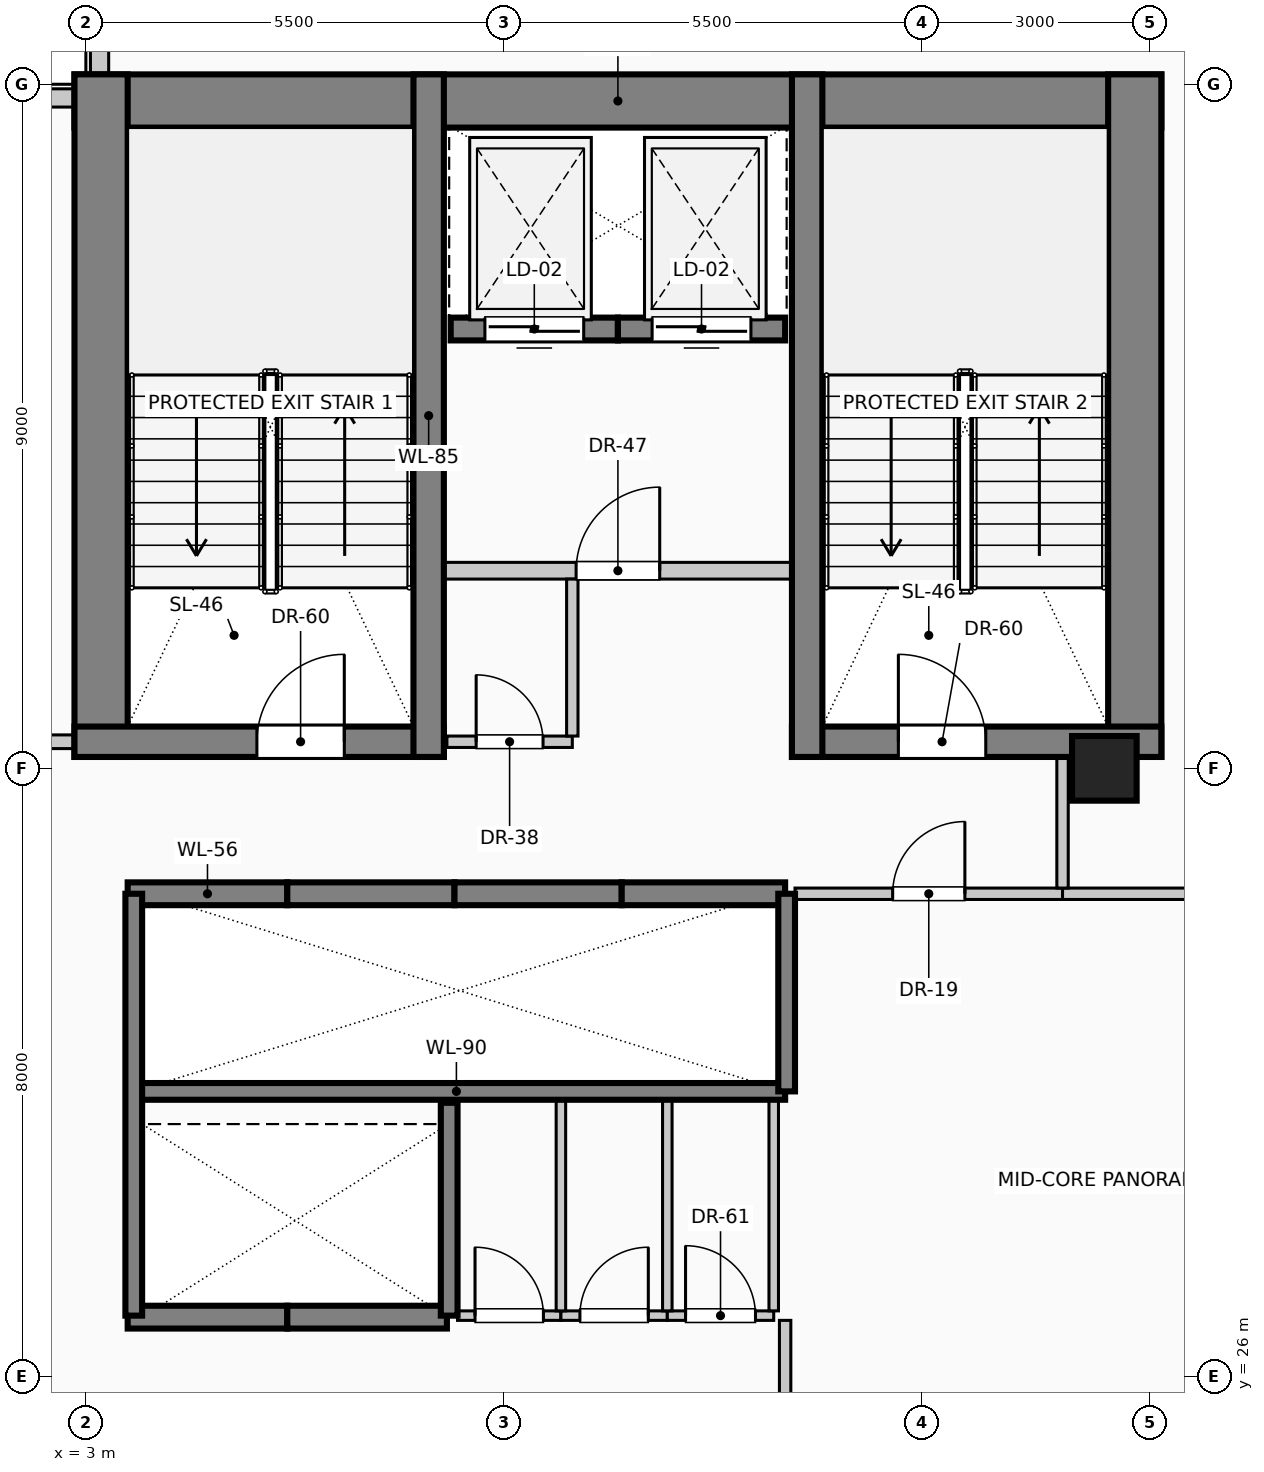
"""IFC4 building model, lengths in metres.
Left out: names, types, materials, properties, quantities, classifications, styles, units other than length and angle.
Written with IfcOpenShell. Run it as: python <this file> out.ifc"""

import sys

from ifc_helpers import new_model, si_unit, direction, frame, frame_2d, origin, origin_2d, place, context, subcontext, project, spatial, rectangle, circle, extrude, element, fill, save


model = new_model("IFC4")
c1 = context("Model", 3, precision=1e-05, world=origin(), true_north=direction((0.0, 1.0)))
c2 = subcontext(c1, "Body", "Model", "MODEL_VIEW")
j1 = project(units=[si_unit("LENGTHUNIT", "METRE"), si_unit("PLANEANGLEUNIT", "RADIAN")], contexts=[c1])
p1 = place(None, origin())
s1 = spatial("IfcSite", under=j1, at=p1, CompositionType="ELEMENT")
p2 = place(p1, origin())
s2 = spatial("IfcBuilding", under=s1, at=p2, CompositionType="ELEMENT")
p3 = place(p2, frame((0.0, 0.0, 186.6)))
s3 = spatial("IfcBuildingStorey", under=s2, at=p3, CompositionType="ELEMENT", Elevation=186.6)
p4 = place(p3, frame((2.85, 42.78, 0.0), z_axis=(0.0, 0.0, 1.0), x_axis=(1.0, 0.0, 0.0)))
e1 = element("IfcWall", 1, at=p4, inside=s3, PredefinedType="SHEAR", context=c2, shape_type="SweptSolid", body=[
    extrude(rectangle(XDim=14.3, YDim=0.7, at=frame_2d((7.15, 0.0))), origin(), (0.0, 0.0, 1.0), 4.0),
])
for number, where, z_axis, x_axis in (
    (2, (3.2, 34.15, 0.0), (0.0, 0.0, 1.0), (0.0, 1.0, 0.0)),
    (3, (16.8, 34.15, 0.0), (0.0, 0.0, 1.0), (0.0, 1.0, 0.0)),
):
    element("IfcWall", number, at=place(p3, frame(where, z_axis=z_axis, x_axis=x_axis)), inside=s3, PredefinedType="SHEAR", context=c2, shape_type="SweptSolid", body=[
        extrude(rectangle(XDim=8.98, YDim=0.7, at=frame_2d((4.49, 0.0))), origin(), (0.0, 0.0, 1.0), 4.0),
    ])
p5 = place(p3, frame((2.85, 34.35, 0.0), z_axis=(0.0, 0.0, 1.0), x_axis=(1.0, 0.0, 0.0)))
e4 = element("IfcWall", 4, at=p5, inside=s3, PredefinedType="SHEAR", context=c2, shape_type="SweptSolid", body=[
    extrude(rectangle(XDim=4.86, YDim=0.4, at=frame_2d((2.43, 0.0))), origin(), (0.0, 0.0, 1.0), 4.0),
])
p6 = place(p5, frame((2.4, 0.0, 0.0)))
e5 = element("IfcOpeningElement", 5, at=p6, cuts=e4, PredefinedType="OPENING", context=c2, shape_type="SweptSolid", body=[
    extrude(rectangle(XDim=1.15, YDim=2.2, at=frame_2d((0.575, 1.1))), frame((0.0, 0.21, 0.0), z_axis=(0.0, -1.0, 0.0), x_axis=(1.0, 0.0, 0.0)), (0.0, 0.0, 1.0), 0.42),
])
p7 = place(p3, frame((12.29, 34.35, 0.0), z_axis=(0.0, 0.0, 1.0), x_axis=(1.0, 0.0, 0.0)))
e6 = element("IfcWall", 6, at=p7, inside=s3, PredefinedType="SHEAR", context=c2, shape_type="SweptSolid", body=[
    extrude(rectangle(XDim=4.86, YDim=0.4, at=frame_2d((2.43, 0.0))), origin(), (0.0, 0.0, 1.0), 4.0),
])
p8 = place(p7, frame((1.4, 0.0, 0.0)))
e7 = element("IfcOpeningElement", 7, at=p8, cuts=e6, PredefinedType="OPENING", context=c2, shape_type="SweptSolid", body=[
    extrude(rectangle(XDim=1.15, YDim=2.2, at=frame_2d((0.575, 1.1))), frame((0.0, 0.21, 0.0), z_axis=(0.0, -1.0, 0.0), x_axis=(1.0, 0.0, 0.0)), (0.0, 0.0, 1.0), 0.42),
])
for number, where, z_axis, x_axis in (
    (8, (7.51, 34.15, 0.0), (0.0, 0.0, 1.0), (0.0, 1.0, 0.0)),
    (9, (12.49, 34.15, 0.0), (0.0, 0.0, 1.0), (0.0, 1.0, 0.0)),
):
    element("IfcWall", number, at=place(p3, frame(where, z_axis=z_axis, x_axis=x_axis)), inside=s3, PredefinedType="SHEAR", context=c2, shape_type="SweptSolid", body=[
        extrude(rectangle(XDim=8.98, YDim=0.4, at=frame_2d((4.49, 0.0))), origin(), (0.0, 0.0, 1.0), 4.0),
    ])
p9 = place(p3, frame((16.4, 34.0, 0.0), z_axis=(0.0, 0.0, 1.0), x_axis=(1.0, 0.0, 0.0)))
e10 = element("IfcColumn", 10, at=p9, inside=s3, PredefinedType="COLUMN", context=c2, shape_type="SweptSolid", body=[
    extrude(circle(Radius=0.425, at=origin_2d()), origin(), (0.0, 0.0, 1.0), 4.0),
])
p10 = place(p3, frame((0.6, 42.82, 0.0), z_axis=(0.0, 0.0, 1.0), x_axis=(1.0, 0.0, 0.0)))
e11 = element("IfcWall", 11, at=p10, inside=s3, PredefinedType="SOLIDWALL", context=c2, shape_type="SweptSolid", body=[
    extrude(rectangle(XDim=2.245, YDim=0.24, at=frame_2d((1.123, 0.0))), origin(), (0.0, 0.0, 1.0), 3.75),
])
p11 = place(p3, frame((3.18, 43.135, 0.0), z_axis=(0.0, 0.0, 1.0), x_axis=(0.0, 1.0, 0.0)))
e12 = element("IfcWall", 12, at=p11, inside=s3, PredefinedType="SOLIDWALL", context=c2, shape_type="SweptSolid", body=[
    extrude(rectangle(XDim=2.265, YDim=0.24, at=frame_2d((1.132, 0.0))), origin(), (0.0, 0.0, 1.0), 3.75),
])
p12 = place(p3, frame((3.55, 32.35, 0.0), z_axis=(0.0, 0.0, 1.0), x_axis=(1.0, 0.0, 0.0)))
e13 = element("IfcWall", 13, at=p12, inside=s3, PredefinedType="SOLIDWALL", context=c2, shape_type="SweptSolid", body=[
    extrude(rectangle(XDim=2.1, YDim=0.3, at=frame_2d((1.05, 0.0))), origin(), (0.0, 0.0, 1.0), 4.0),
])
p13 = place(p3, frame((5.65, 32.35, 0.0), z_axis=(0.0, 0.0, 1.0), x_axis=(1.0, 0.0, 0.0)))
e14 = element("IfcWall", 14, at=p13, inside=s3, PredefinedType="SOLIDWALL", context=c2, shape_type="SweptSolid", body=[
    extrude(rectangle(XDim=2.2, YDim=0.3, at=frame_2d((1.1, 0.0))), origin(), (0.0, 0.0, 1.0), 4.0),
])
p14 = place(p3, frame((7.85, 32.35, 0.0), z_axis=(0.0, 0.0, 1.0), x_axis=(1.0, 0.0, 0.0)))
e15 = element("IfcWall", 15, at=p14, inside=s3, PredefinedType="SOLIDWALL", context=c2, shape_type="SweptSolid", body=[
    extrude(rectangle(XDim=2.2, YDim=0.3, at=frame_2d((1.1, 0.0))), origin(), (0.0, 0.0, 1.0), 4.0),
])
p15 = place(p3, frame((10.05, 32.35, 0.0), z_axis=(0.0, 0.0, 1.0), x_axis=(1.0, 0.0, 0.0)))
e16 = element("IfcWall", 16, at=p15, inside=s3, PredefinedType="SOLIDWALL", context=c2, shape_type="SweptSolid", body=[
    extrude(rectangle(XDim=2.15, YDim=0.3, at=frame_2d((1.075, 0.0))), origin(), (0.0, 0.0, 1.0), 4.0),
])
p16 = place(p3, frame((5.65, 26.78, 0.0), z_axis=(0.0, 0.0, 1.0), x_axis=(-1.0, 0.0, 0.0)))
e17 = element("IfcWall", 17, at=p16, inside=s3, PredefinedType="SOLIDWALL", context=c2, shape_type="SweptSolid", body=[
    extrude(rectangle(XDim=2.1, YDim=0.3, at=frame_2d((1.05, 0.0))), origin(), (0.0, 0.0, 1.0), 4.0),
])
p17 = place(p3, frame((7.75, 26.78, 0.0), z_axis=(0.0, 0.0, 1.0), x_axis=(-1.0, 0.0, 0.0)))
e18 = element("IfcWall", 18, at=p17, inside=s3, PredefinedType="SOLIDWALL", context=c2, shape_type="SweptSolid", body=[
    extrude(rectangle(XDim=2.1, YDim=0.3, at=frame_2d((1.05, 0.0))), origin(), (0.0, 0.0, 1.0), 4.0),
])
p18 = place(p3, frame((10.0, 39.78, 0.0), z_axis=(0.0, 0.0, 1.0), x_axis=(-1.0, 0.0, 0.0)))
e19 = element("IfcWall", 19, at=p18, inside=s3, PredefinedType="SOLIDWALL", context=c2, shape_type="SweptSolid", body=[
    extrude(rectangle(XDim=2.2, YDim=0.3, at=frame_2d((1.1, 0.0))), origin(), (0.0, 0.0, 1.0), 4.0),
])
p19 = place(p18, frame((0.45, 0.0, 0.0)))
e20 = element("IfcOpeningElement", 20, at=p19, cuts=e19, PredefinedType="OPENING", context=c2, shape_type="SweptSolid", body=[
    extrude(rectangle(XDim=1.3, YDim=2.25, at=frame_2d((0.65, 1.125))), frame((0.0, 0.16, 0.0), z_axis=(0.0, -1.0, 0.0), x_axis=(1.0, 0.0, 0.0)), (0.0, 0.0, 1.0), 0.32),
])
p20 = place(p3, frame((12.2, 39.78, 0.0), z_axis=(0.0, 0.0, 1.0), x_axis=(-1.0, 0.0, 0.0)))
e21 = element("IfcWall", 21, at=p20, inside=s3, PredefinedType="SOLIDWALL", context=c2, shape_type="SweptSolid", body=[
    extrude(rectangle(XDim=2.2, YDim=0.3, at=frame_2d((1.1, 0.0))), origin(), (0.0, 0.0, 1.0), 4.0),
])
p21 = place(p20, frame((0.45, 0.0, 0.0)))
e22 = element("IfcOpeningElement", 22, at=p21, cuts=e21, PredefinedType="OPENING", context=c2, shape_type="SweptSolid", body=[
    extrude(rectangle(XDim=1.3, YDim=2.25, at=frame_2d((0.65, 1.125))), frame((0.0, 0.16, 0.0), z_axis=(0.0, -1.0, 0.0), x_axis=(1.0, 0.0, 0.0)), (0.0, 0.0, 1.0), 0.32),
])
p22 = place(p3, frame((3.55, 29.75, 0.0), z_axis=(0.0, 0.0, 1.0), x_axis=(1.0, 0.0, 0.0)))
e23 = element("IfcWall", 23, at=p22, inside=s3, PredefinedType="SOLIDWALL", context=c2, shape_type="SweptSolid", body=[
    extrude(rectangle(XDim=8.65, YDim=0.22, at=frame_2d((4.325, 0.0))), origin(), (0.0, 0.0, 1.0), 4.0),
])
p23 = place(p3, frame((3.63, 26.8, 0.0), z_axis=(0.0, 0.0, 1.0), x_axis=(0.0, 1.0, 0.0)))
e24 = element("IfcWall", 24, at=p23, inside=s3, PredefinedType="SOLIDWALL", context=c2, shape_type="SweptSolid", body=[
    extrude(rectangle(XDim=5.55, YDim=0.22, at=frame_2d((2.775, 0.0))), origin(), (0.0, 0.0, 1.0), 4.0),
])
p24 = place(p3, frame((7.78, 26.8, 0.0), z_axis=(0.0, 0.0, 1.0), x_axis=(0.0, 1.0, 0.0)))
e25 = element("IfcWall", 25, at=p24, inside=s3, PredefinedType="SOLIDWALL", context=c2, shape_type="SweptSolid", body=[
    extrude(rectangle(XDim=2.8, YDim=0.22, at=frame_2d((1.4, 0.0))), origin(), (0.0, 0.0, 1.0), 4.0),
])
p25 = place(p3, frame((12.22, 29.75, 0.0), z_axis=(0.0, 0.0, 1.0), x_axis=(0.0, 1.0, 0.0)))
e26 = element("IfcWall", 26, at=p25, inside=s3, PredefinedType="SOLIDWALL", context=c2, shape_type="SweptSolid", body=[
    extrude(rectangle(XDim=2.6, YDim=0.22, at=frame_2d((1.3, 0.0))), origin(), (0.0, 0.0, 1.0), 4.0),
])
p26 = place(p3, frame((7.51, 36.6, 0.0), z_axis=(0.0, 0.0, 1.0), x_axis=(1.0, 0.0, 0.0)))
e27 = element("IfcWall", 27, at=p26, inside=s3, PredefinedType="PARTITIONING", context=c2, shape_type="SweptSolid", body=[
    extrude(rectangle(XDim=4.98, YDim=0.22, at=frame_2d((2.49, 0.0))), origin(), (0.0, 0.0, 1.0), 3.75),
])
p27 = place(p26, frame((1.94, 0.0, 0.0)))
e28 = element("IfcOpeningElement", 28, at=p27, cuts=e27, PredefinedType="OPENING", context=c2, shape_type="SweptSolid", body=[
    extrude(rectangle(XDim=1.1, YDim=2.2, at=frame_2d((0.55, 1.1))), frame((0.0, 0.12, 0.0), z_axis=(0.0, -1.0, 0.0), x_axis=(1.0, 0.0, 0.0)), (0.0, 0.0, 1.0), 0.24),
])
p28 = place(p3, frame((7.89, 26.8, 0.0), z_axis=(0.0, 0.0, 1.0), x_axis=(1.0, 0.0, 0.0)))
e29 = element("IfcWall", 29, at=p28, inside=s3, PredefinedType="PARTITIONING", context=c2, shape_type="SweptSolid", body=[
    extrude(rectangle(XDim=1.36, YDim=0.125, at=frame_2d((0.68, 0.0))), origin(), (0.0, 0.0, 1.0), 3.75),
])
p29 = place(p28, frame((0.23, 0.0, 0.0)))
e30 = element("IfcOpeningElement", 30, at=p29, cuts=e29, PredefinedType="OPENING", context=c2, shape_type="SweptSolid", body=[
    extrude(rectangle(XDim=0.9, YDim=2.1, at=frame_2d((0.45, 1.05))), frame((0.0, 0.073, 0.0), z_axis=(0.0, -1.0, 0.0), x_axis=(1.0, 0.0, 0.0)), (0.0, 0.0, 1.0), 0.145),
])
p30 = place(p3, frame((9.25, 26.8, 0.0), z_axis=(0.0, 0.0, 1.0), x_axis=(1.0, 0.0, 0.0)))
e31 = element("IfcWall", 31, at=p30, inside=s3, PredefinedType="PARTITIONING", context=c2, shape_type="SweptSolid", body=[
    extrude(rectangle(XDim=1.4, YDim=0.125, at=frame_2d((0.7, 0.0))), origin(), (0.0, 0.0, 1.0), 3.75),
])
p31 = place(p30, frame((0.25, 0.0, 0.0)))
e32 = element("IfcOpeningElement", 32, at=p31, cuts=e31, PredefinedType="OPENING", context=c2, shape_type="SweptSolid", body=[
    extrude(rectangle(XDim=0.9, YDim=2.1, at=frame_2d((0.45, 1.05))), frame((0.0, 0.073, 0.0), z_axis=(0.0, -1.0, 0.0), x_axis=(1.0, 0.0, 0.0)), (0.0, 0.0, 1.0), 0.145),
])
p32 = place(p3, frame((10.65, 26.8, 0.0), z_axis=(0.0, 0.0, 1.0), x_axis=(1.0, 0.0, 0.0)))
e33 = element("IfcWall", 33, at=p32, inside=s3, PredefinedType="PARTITIONING", context=c2, shape_type="SweptSolid", body=[
    extrude(rectangle(XDim=1.4, YDim=0.125, at=frame_2d((0.7, 0.0))), origin(), (0.0, 0.0, 1.0), 3.75),
])
p33 = place(p32, frame((0.24, 0.0, 0.0)))
e34 = element("IfcOpeningElement", 34, at=p33, cuts=e33, PredefinedType="OPENING", context=c2, shape_type="SweptSolid", body=[
    extrude(rectangle(XDim=0.92, YDim=2.1, at=frame_2d((0.46, 1.05))), frame((0.0, 0.073, 0.0), z_axis=(0.0, -1.0, 0.0), x_axis=(1.0, 0.0, 0.0)), (0.0, 0.0, 1.0), 0.145),
])
p34 = place(p3, frame((12.33, 32.35, 0.0), z_axis=(0.0, 0.0, 1.0), x_axis=(1.0, 0.0, 0.0)))
e35 = element("IfcWall", 35, at=p34, inside=s3, PredefinedType="PARTITIONING", context=c2, shape_type="SweptSolid", body=[
    extrude(rectangle(XDim=3.52, YDim=0.15, at=frame_2d((1.76, 0.0))), origin(), (0.0, 0.0, 1.0), 3.75),
])
p35 = place(p34, frame((1.285, 0.0, 0.0)))
e36 = element("IfcOpeningElement", 36, at=p35, cuts=e35, PredefinedType="OPENING", context=c2, shape_type="SweptSolid", body=[
    extrude(rectangle(XDim=0.95, YDim=2.15, at=frame_2d((0.475, 1.075))), frame((0.0, 0.085, 0.0), z_axis=(0.0, -1.0, 0.0), x_axis=(1.0, 0.0, 0.0)), (0.0, 0.0, 1.0), 0.17),
])
p36 = place(p3, frame((15.85, 32.35, 0.0), z_axis=(0.0, 0.0, 1.0), x_axis=(1.0, 0.0, 0.0)))
e37 = element("IfcWall", 37, at=p36, inside=s3, PredefinedType="PARTITIONING", context=c2, shape_type="SweptSolid", body=[
    extrude(rectangle(XDim=8.03, YDim=0.15, at=frame_2d((4.015, 0.0))), origin(), (0.0, 0.0, 1.0), 3.75),
])
p37 = place(p3, frame((1.15, 34.35, 0.0), z_axis=(0.0, 0.0, 1.0), x_axis=(1.0, 0.0, 0.0)))
e38 = element("IfcWall", 38, at=p37, inside=s3, PredefinedType="PARTITIONING", context=c2, shape_type="SweptSolid", body=[
    extrude(rectangle(XDim=1.7, YDim=0.18, at=frame_2d((0.85, 0.0))), origin(), (0.0, 0.0, 1.0), 3.75),
])
p38 = place(p3, frame((7.75, 34.35, 0.0), z_axis=(0.0, 0.0, 1.0), x_axis=(1.0, 0.0, 0.0)))
e39 = element("IfcWall", 39, at=p38, inside=s3, PredefinedType="PARTITIONING", context=c2, shape_type="SweptSolid", body=[
    extrude(rectangle(XDim=1.65, YDim=0.15, at=frame_2d((0.825, 0.0))), origin(), (0.0, 0.0, 1.0), 3.75),
])
p39 = place(p38, frame((0.385, 0.0, 0.0)))
e40 = element("IfcOpeningElement", 40, at=p39, cuts=e39, PredefinedType="OPENING", context=c2, shape_type="SweptSolid", body=[
    extrude(rectangle(XDim=0.88, YDim=2.1, at=frame_2d((0.44, 1.05))), frame((0.0, 0.085, 0.0), z_axis=(0.0, -1.0, 0.0), x_axis=(1.0, 0.0, 0.0)), (0.0, 0.0, 1.0), 0.17),
])
p40 = place(p3, frame((9.25, 26.863, 0.0), z_axis=(0.0, 0.0, 1.0), x_axis=(0.0, 1.0, 0.0)))
e41 = element("IfcWall", 41, at=p40, inside=s3, PredefinedType="PARTITIONING", context=c2, shape_type="SweptSolid", body=[
    extrude(rectangle(XDim=2.777, YDim=0.125, at=frame_2d((1.389, 0.0))), origin(), (0.0, 0.0, 1.0), 3.75),
])
p41 = place(p3, frame((9.4, 34.425, 0.0), z_axis=(0.0, 0.0, 1.0), x_axis=(0.0, 1.0, 0.0)))
e42 = element("IfcWall", 42, at=p41, inside=s3, PredefinedType="PARTITIONING", context=c2, shape_type="SweptSolid", body=[
    extrude(rectangle(XDim=2.065, YDim=0.15, at=frame_2d((1.032, 0.0))), origin(), (0.0, 0.0, 1.0), 3.75),
])
for number, where, z_axis, x_axis in (
    (43, (10.65, 26.863, 0.0), (0.0, 0.0, 1.0), (0.0, 1.0, 0.0)),
    (44, (12.05, 26.863, 0.0), (0.0, 0.0, 1.0), (0.0, 1.0, 0.0)),
):
    element("IfcWall", number, at=place(p3, frame(where, z_axis=z_axis, x_axis=x_axis)), inside=s3, PredefinedType="PARTITIONING", context=c2, shape_type="SweptSolid", body=[
        extrude(rectangle(XDim=2.777, YDim=0.125, at=frame_2d((1.389, 0.0))), origin(), (0.0, 0.0, 1.0), 3.75),
    ])
p42 = place(p3, frame((12.2, 24.863, 0.0), z_axis=(0.0, 0.0, 1.0), x_axis=(0.0, 1.0, 0.0)))
e45 = element("IfcWall", 45, at=p42, inside=s3, PredefinedType="PARTITIONING", context=c2, shape_type="SweptSolid", body=[
    extrude(rectangle(XDim=1.875, YDim=0.15, at=frame_2d((0.938, 0.0))), origin(), (0.0, 0.0, 1.0), 3.75),
])
p43 = place(p3, frame((15.85, 32.425, 0.0), z_axis=(0.0, 0.0, 1.0), x_axis=(0.0, 1.0, 0.0)))
e46 = element("IfcWall", 46, at=p43, inside=s3, PredefinedType="PARTITIONING", context=c2, shape_type="SweptSolid", body=[
    extrude(rectangle(XDim=1.725, YDim=0.15, at=frame_2d((0.862, 0.0))), origin(), (0.0, 0.0, 1.0), 3.75),
])
p44 = place(p19, origin())
e47 = element("IfcDoor", 47, at=p44, inside=s3, OperationType="SLIDING_TO_LEFT", PredefinedType="DOOR", context=c2, shape_type="SweptSolid", body=[
    extrude(rectangle(XDim=1.3, YDim=2.25, at=frame_2d((0.65, 1.125))), frame((0.0, 0.025, 0.0), z_axis=(0.0, -1.0, 0.0), x_axis=(1.0, 0.0, 0.0)), (0.0, 0.0, 1.0), 0.05),
])
fill(e20, e47)
p45 = place(p21, origin())
e48 = element("IfcDoor", 48, at=p45, inside=s3, OperationType="SLIDING_TO_RIGHT", PredefinedType="DOOR", context=c2, shape_type="SweptSolid", body=[
    extrude(rectangle(XDim=1.3, YDim=2.25, at=frame_2d((0.65, 1.125))), frame((0.0, 0.025, 0.0), z_axis=(0.0, -1.0, 0.0), x_axis=(1.0, 0.0, 0.0)), (0.0, 0.0, 1.0), 0.05),
])
fill(e22, e48)
p46 = place(p6, origin())
e49 = element("IfcDoor", 49, at=p46, inside=s3, OperationType="SINGLE_SWING_RIGHT", PredefinedType="DOOR", context=c2, shape_type="SweptSolid", body=[
    extrude(rectangle(XDim=1.15, YDim=2.2, at=frame_2d((0.575, 1.1))), frame((0.0, 0.025, 0.0), z_axis=(0.0, -1.0, 0.0), x_axis=(1.0, 0.0, 0.0)), (0.0, 0.0, 1.0), 0.05),
])
fill(e5, e49)
p47 = place(p8, origin())
e50 = element("IfcDoor", 50, at=p47, inside=s3, OperationType="SINGLE_SWING_LEFT", PredefinedType="DOOR", context=c2, shape_type="SweptSolid", body=[
    extrude(rectangle(XDim=1.15, YDim=2.2, at=frame_2d((0.575, 1.1))), frame((0.0, 0.025, 0.0), z_axis=(0.0, -1.0, 0.0), x_axis=(1.0, 0.0, 0.0)), (0.0, 0.0, 1.0), 0.05),
])
fill(e7, e50)
p48 = place(p27, origin())
e51 = element("IfcDoor", 51, at=p48, inside=s3, OperationType="SINGLE_SWING_RIGHT", PredefinedType="DOOR", context=c2, shape_type="SweptSolid", body=[
    extrude(rectangle(XDim=1.1, YDim=2.2, at=frame_2d((0.55, 1.1))), frame((0.0, 0.025, 0.0), z_axis=(0.0, -1.0, 0.0), x_axis=(1.0, 0.0, 0.0)), (0.0, 0.0, 1.0), 0.05),
])
fill(e28, e51)
p49 = place(p29, origin())
e52 = element("IfcDoor", 52, at=p49, inside=s3, OperationType="SINGLE_SWING_LEFT", PredefinedType="DOOR", context=c2, shape_type="SweptSolid", body=[
    extrude(rectangle(XDim=0.9, YDim=2.1, at=frame_2d((0.45, 1.05))), frame((0.0, 0.025, 0.0), z_axis=(0.0, -1.0, 0.0), x_axis=(1.0, 0.0, 0.0)), (0.0, 0.0, 1.0), 0.05),
])
fill(e30, e52)
p50 = place(p31, origin())
e53 = element("IfcDoor", 53, at=p50, inside=s3, OperationType="SINGLE_SWING_RIGHT", PredefinedType="DOOR", context=c2, shape_type="SweptSolid", body=[
    extrude(rectangle(XDim=0.9, YDim=2.1, at=frame_2d((0.45, 1.05))), frame((0.0, 0.025, 0.0), z_axis=(0.0, -1.0, 0.0), x_axis=(1.0, 0.0, 0.0)), (0.0, 0.0, 1.0), 0.05),
])
fill(e32, e53)
p51 = place(p33, origin())
e54 = element("IfcDoor", 54, at=p51, inside=s3, OperationType="SINGLE_SWING_LEFT", PredefinedType="DOOR", context=c2, shape_type="SweptSolid", body=[
    extrude(rectangle(XDim=0.92, YDim=2.1, at=frame_2d((0.46, 1.05))), frame((0.0, 0.025, 0.0), z_axis=(0.0, -1.0, 0.0), x_axis=(1.0, 0.0, 0.0)), (0.0, 0.0, 1.0), 0.05),
])
fill(e34, e54)
p52 = place(p35, origin())
e55 = element("IfcDoor", 55, at=p52, inside=s3, OperationType="SINGLE_SWING_RIGHT", PredefinedType="DOOR", context=c2, shape_type="SweptSolid", body=[
    extrude(rectangle(XDim=0.95, YDim=2.15, at=frame_2d((0.475, 1.075))), frame((0.0, 0.025, 0.0), z_axis=(0.0, -1.0, 0.0), x_axis=(1.0, 0.0, 0.0)), (0.0, 0.0, 1.0), 0.05),
])
fill(e36, e55)
p53 = place(p39, origin())
e56 = element("IfcDoor", 56, at=p53, inside=s3, OperationType="SINGLE_SWING_LEFT", PredefinedType="DOOR", context=c2, shape_type="SweptSolid", body=[
    extrude(rectangle(XDim=0.88, YDim=2.1, at=frame_2d((0.44, 1.05))), frame((0.0, 0.025, 0.0), z_axis=(0.0, -1.0, 0.0), x_axis=(1.0, 0.0, 0.0)), (0.0, 0.0, 1.0), 0.05),
])
fill(e40, e56)
save(model, sys.argv[1])
